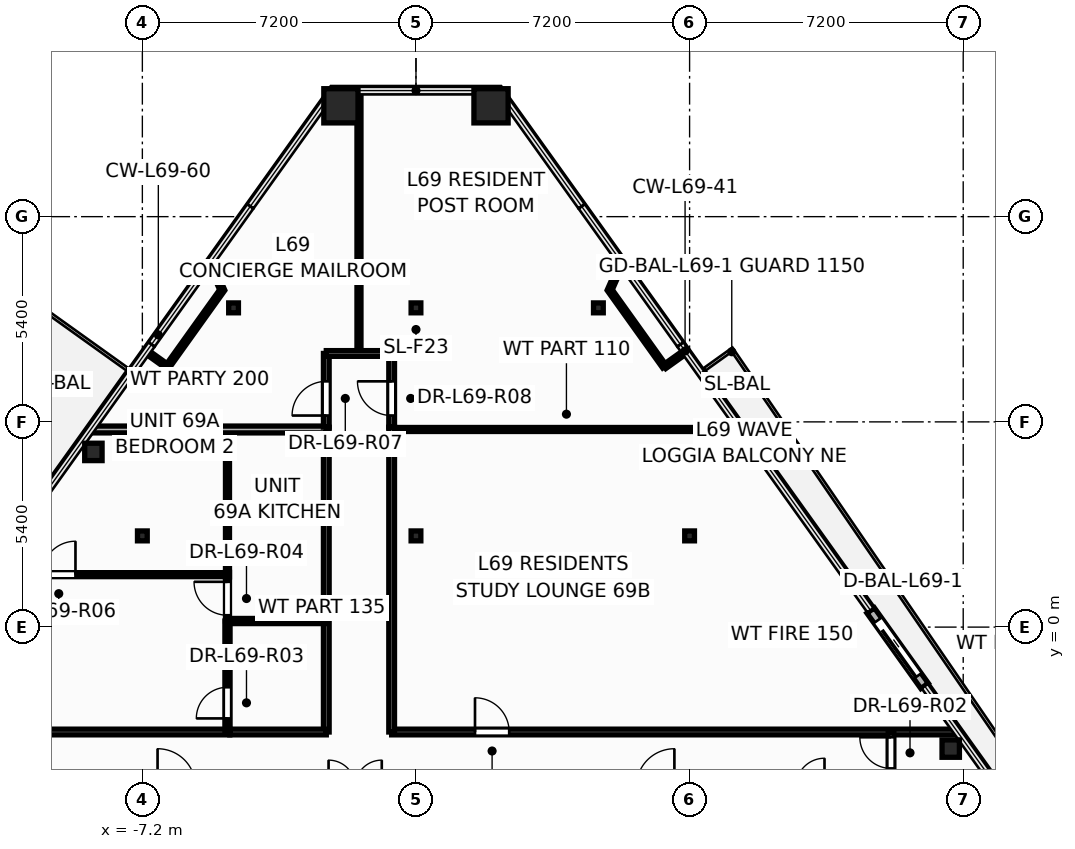
"""IFC4 building model, lengths in metres.
Left out: names, types, materials, properties, quantities, classifications, styles, units other than length and angle.
Written with IfcOpenShell. Run it as: python <this file> out.ifc"""

import sys

from ifc_helpers import new_model, si_unit, direction, frame, frame_2d, origin, origin_2d, place, context, subcontext, project, spatial, rectangle, hollow_rectangle, hollow_circle, i_section, extrude, element, fill, save


model = new_model("IFC4")
c1 = context("Model", 3, precision=1e-05, world=origin(), true_north=direction((0.0, 1.0)))
c2 = subcontext(c1, "Body", "Model", "MODEL_VIEW")
j1 = project(units=[si_unit("LENGTHUNIT", "METRE"), si_unit("PLANEANGLEUNIT", "RADIAN")], contexts=[c1])
p1 = place(None, origin())
s1 = spatial("IfcSite", under=j1, at=p1, CompositionType="ELEMENT")
p2 = place(p1, origin())
s2 = spatial("IfcBuilding", under=s1, at=p2, CompositionType="ELEMENT")
p3 = place(p2, frame((0.0, 0.0, 263.4)))
s3 = spatial("IfcBuildingStorey", under=s2, at=p3, CompositionType="ELEMENT", Elevation=263.4)
for number, where, z_axis, x_axis in (
    (1, (1.975, 13.717, 0.0), (0.0, 0.0, 1.0), (1.0, 0.0, 0.0)),
    (2, (-1.975, 13.717, 0.0), (0.0, 0.0, 1.0), (1.0, 0.0, 0.0)),
):
    element("IfcColumn", number, at=place(p3, frame(where, z_axis=z_axis, x_axis=x_axis)), inside=s3, PredefinedType="COLUMN", context=c2, shape_type="SweptSolid", body=[
        extrude(hollow_rectangle(XDim=0.9, YDim=0.9, WallThickness=0.04, at=origin_2d()), origin(), (0.0, 0.0, 1.0), 3.6),
    ])
for number, where, z_axis, x_axis in (
    (3, (14.072, -3.196, 0.0), (0.0, 0.0, 1.0), (1.0, 0.0, 0.0)),
    (4, (8.489, 4.61, 0.0), (0.0, 0.0, 1.0), (1.0, 0.0, 0.0)),
    (5, (-8.489, 4.61, 0.0), (0.0, 0.0, 1.0), (1.0, 0.0, 0.0)),
):
    element("IfcColumn", number, at=place(p3, frame(where, z_axis=z_axis, x_axis=x_axis)), inside=s3, PredefinedType="COLUMN", context=c2, shape_type="SweptSolid", body=[
        extrude(hollow_circle(Radius=0.229, WallThickness=0.016, at=origin_2d()), origin(), (0.0, 0.0, 1.0), 3.6),
    ])
for number, where, z_axis, x_axis in (
    (6, (-7.2, 2.4, 0.0), (0.0, 0.0, 1.0), (1.0, 0.0, 0.0)),
    (7, (0.0, 2.4, 0.0), (0.0, 0.0, 1.0), (1.0, 0.0, 0.0)),
    (8, (7.2, 2.4, 0.0), (0.0, 0.0, 1.0), (1.0, 0.0, 0.0)),
    (9, (-4.8, 8.4, 0.0), (0.0, 0.0, 1.0), (1.0, 0.0, 0.0)),
    (10, (0.0, 8.4, 0.0), (0.0, 0.0, 1.0), (1.0, 0.0, 0.0)),
    (11, (4.8, 8.4, 0.0), (0.0, 0.0, 1.0), (1.0, 0.0, 0.0)),
):
    element("IfcColumn", number, at=place(p3, frame(where, z_axis=z_axis, x_axis=x_axis)), inside=s3, PredefinedType="COLUMN", context=c2, shape_type="SweptSolid", body=[
        extrude(i_section(OverallWidth=0.256, OverallDepth=0.26, WebThickness=0.01, FlangeThickness=0.017, at=origin_2d()), origin(), (0.0, 0.0, 1.0), 3.6),
    ])
p4 = place(p3, frame((13.383, -1.547, -0.015), z_axis=(0.0, 0.0, 1.0), x_axis=(-0.58167352525, 0.813422344187, 0.0)))
e12 = element("IfcWall", 12, at=p4, inside=s3, PredefinedType="STANDARD", context=c2, shape_type="SweptSolid", body=[
    extrude(rectangle(XDim=2.44, YDim=0.24, at=frame_2d((1.22, 0.0))), origin(), (0.0, 0.0, 1.0), 2.878),
])
p5 = place(p4, frame((0.32, 0.0, 0.015)))
e13 = element("IfcOpeningElement", 13, at=p5, cuts=e12, PredefinedType="OPENING", context=c2, shape_type="SweptSolid", body=[
    extrude(rectangle(XDim=1.806, YDim=2.204, at=frame_2d((0.9, 1.102))), frame((0.0, 0.13, 0.0), z_axis=(0.0, -1.0, 0.0), x_axis=(1.0, 0.0, 0.0)), (0.0, 0.0, 1.0), 0.26),
])
p6 = place(p3, frame((-0.64, -2.76, 0.0), z_axis=(0.0, 0.0, 1.0), x_axis=(1.0, 0.0, 0.0)))
e14 = element("IfcWall", 14, at=p6, inside=s3, PredefinedType="PARTITIONING", context=c2, shape_type="SweptSolid", body=[
    extrude(rectangle(XDim=14.891, YDim=0.15, at=frame_2d((7.446, 0.0))), origin(), (0.0, 0.0, 1.0), 2.32),
])
p7 = place(p6, frame((2.193, 0.0, 0.0)))
e15 = element("IfcOpeningElement", 15, at=p7, cuts=e14, PredefinedType="OPENING", context=c2, shape_type="SweptSolid", body=[
    extrude(rectangle(XDim=0.906, YDim=2.104, at=frame_2d((0.45, 1.052))), frame((0.0, 0.085, 0.0), z_axis=(0.0, -1.0, 0.0), x_axis=(1.0, 0.0, 0.0)), (0.0, 0.0, 1.0), 0.17),
])
p8 = place(p3, frame((-14.251, -2.76, 0.0), z_axis=(0.0, 0.0, 1.0), x_axis=(1.0, 0.0, 0.0)))
e16 = element("IfcWall", 16, at=p8, inside=s3, PredefinedType="PARTITIONING", context=c2, shape_type="SweptSolid", body=[
    extrude(rectangle(XDim=9.351, YDim=0.15, at=frame_2d((4.676, 0.0))), origin(), (0.0, 0.0, 1.0), 2.32),
])
p9 = place(p8, frame((3.386, 0.0, 0.0)))
e17 = element("IfcOpeningElement", 17, at=p9, cuts=e16, PredefinedType="OPENING", context=c2, shape_type="SweptSolid", body=[
    extrude(rectangle(XDim=0.906, YDim=2.104, at=frame_2d((0.45, 1.052))), frame((0.0, 0.085, 0.0), z_axis=(0.0, -1.0, 0.0), x_axis=(1.0, 0.0, 0.0)), (0.0, 0.0, 1.0), 0.17),
])
p10 = place(p3, frame((-0.64, 5.2, 0.0), z_axis=(0.0, 0.0, 1.0), x_axis=(1.0, 0.0, 0.0)))
e18 = element("IfcWall", 18, at=p10, inside=s3, PredefinedType="PARTITIONING", context=c2, shape_type="SweptSolid", body=[
    extrude(rectangle(XDim=9.198, YDim=0.105, at=frame_2d((4.599, 0.0))), origin(), (0.0, 0.0, 1.0), 2.32),
])
p11 = place(p3, frame((-0.64, -2.76, 0.0), z_axis=(0.0, 0.0, 1.0), x_axis=(0.0, 1.0, 0.0)))
e19 = element("IfcWall", 19, at=p11, inside=s3, PredefinedType="PARTITIONING", context=c2, shape_type="SweptSolid", body=[
    extrude(rectangle(XDim=8.02, YDim=0.15, at=frame_2d((4.01, 0.0))), origin(), (0.0, 0.0, 1.0), 2.32),
])
p12 = place(p3, frame((-1.5, 7.2, 0.0), z_axis=(0.0, 0.0, 1.0), x_axis=(0.0, 1.0, 0.0)))
e20 = element("IfcWall", 20, at=p12, inside=s3, PredefinedType="PARTITIONING", context=c2, shape_type="SweptSolid", body=[
    extrude(rectangle(XDim=6.917, YDim=0.105, at=frame_2d((3.458, 0.0))), origin(), (0.0, 0.0, 1.0), 2.718),
])
p13 = place(p3, frame((-11.29, 1.38, 0.0), z_axis=(0.0, 0.0, 1.0), x_axis=(1.0, 0.0, 0.0)))
e21 = element("IfcWall", 21, at=p13, inside=s3, PredefinedType="PARTITIONING", context=c2, shape_type="SweptSolid", body=[
    extrude(rectangle(XDim=6.33, YDim=0.105, at=frame_2d((3.165, 0.0))), origin(), (0.0, 0.0, 1.0), 2.32),
])
p14 = place(p13, frame((1.45, 0.0, 0.0)))
e22 = element("IfcOpeningElement", 22, at=p14, cuts=e21, PredefinedType="OPENING", context=c2, shape_type="SweptSolid", body=[
    extrude(rectangle(XDim=0.886, YDim=2.104, at=frame_2d((0.44, 1.052))), frame((0.0, 0.062, 0.0), z_axis=(0.0, -1.0, 0.0), x_axis=(1.0, 0.0, 0.0)), (0.0, 0.0, 1.0), 0.125),
])
p15 = place(p3, frame((-2.36, -2.76, 0.0), z_axis=(0.0, 0.0, 1.0), x_axis=(0.0, 1.0, 0.0)))
e23 = element("IfcWall", 23, at=p15, inside=s3, PredefinedType="PARTITIONING", context=c2, shape_type="SweptSolid", body=[
    extrude(rectangle(XDim=8.02, YDim=0.15, at=frame_2d((4.01, 0.0))), origin(), (0.0, 0.0, 1.0), 2.32),
])
p16 = place(p3, frame((-4.96, 1.32, 0.0), z_axis=(0.0, 0.0, 1.0), x_axis=(0.0, 1.0, 0.0)))
e24 = element("IfcWall", 24, at=p16, inside=s3, PredefinedType="PARTITIONING", context=c2, shape_type="SweptSolid", body=[
    extrude(rectangle(XDim=3.88, YDim=0.105, at=frame_2d((1.94, 0.0))), origin(), (0.0, 0.0, 1.0), 2.32),
])
p17 = place(p3, frame((-8.558, 5.2, 0.0), z_axis=(0.0, 0.0, 1.0), x_axis=(1.0, 0.0, 0.0)))
e25 = element("IfcWall", 25, at=p17, inside=s3, PredefinedType="PARTITIONING", context=c2, shape_type="SweptSolid", body=[
    extrude(rectangle(XDim=6.198, YDim=0.18, at=frame_2d((3.099, 0.0))), origin(), (0.0, 0.0, 1.0), 2.718),
])
p18 = place(p3, frame((-4.96, -2.76, 0.0), z_axis=(0.0, 0.0, 1.0), x_axis=(0.0, 1.0, 0.0)))
e26 = element("IfcWall", 26, at=p18, inside=s3, PredefinedType="PARTITIONING", context=c2, shape_type="SweptSolid", body=[
    extrude(rectangle(XDim=2.92, YDim=0.135, at=frame_2d((1.46, 0.0))), origin(), (0.0, 0.0, 1.0), 3.345),
])
p19 = place(p18, frame((0.357, 0.0, 0.0)))
e27 = element("IfcOpeningElement", 27, at=p19, cuts=e26, PredefinedType="OPENING", context=c2, shape_type="SweptSolid", body=[
    extrude(rectangle(XDim=0.826, YDim=2.104, at=frame_2d((0.41, 1.052))), frame((0.0, 0.078, 0.0), z_axis=(0.0, -1.0, 0.0), x_axis=(1.0, 0.0, 0.0)), (0.0, 0.0, 1.0), 0.155),
])
p20 = place(p3, frame((-4.898, -2.76, 0.0), z_axis=(0.0, 0.0, 1.0), x_axis=(1.0, 0.0, 0.0)))
e28 = element("IfcWall", 28, at=p20, inside=s3, PredefinedType="PARTITIONING", context=c2, shape_type="SweptSolid", body=[
    extrude(rectangle(XDim=2.538, YDim=0.15, at=frame_2d((1.269, 0.0))), origin(), (0.0, 0.0, 1.0), 2.965),
])
p21 = place(p3, frame((-4.96, 0.16, 0.0), z_axis=(0.0, 0.0, 1.0), x_axis=(1.0, 0.0, 0.0)))
e29 = element("IfcWall", 29, at=p21, inside=s3, PredefinedType="PARTITIONING", context=c2, shape_type="SweptSolid", body=[
    extrude(rectangle(XDim=2.6, YDim=0.135, at=frame_2d((1.3, 0.0))), origin(), (0.0, 0.0, 1.0), 2.965),
])
for number, where, z_axis, x_axis in (
    (30, (-5.097, 8.87, 0.0), (0.0, 0.0, 1.0), (-0.582, -0.813, 0.0)),
    (31, (6.54, 6.853, 0.0), (0.0, 0.0, 1.0), (-0.582, 0.813, 0.0)),
):
    element("IfcWall", number, at=place(p3, frame(where, z_axis=z_axis, x_axis=x_axis)), inside=s3, PredefinedType="PARTITIONING", context=c2, shape_type="SweptSolid", body=[
        extrude(rectangle(XDim=2.48, YDim=0.12, at=frame_2d((1.24, 0.0))), origin(), (0.0, 0.0, 1.0), 2.718),
    ])
p22 = place(p3, frame((-2.36, 5.262, 0.0), z_axis=(0.0, 0.0, 1.0), x_axis=(0.0, 1.0, 0.0)))
e32 = element("IfcWall", 32, at=p22, inside=s3, PredefinedType="PARTITIONING", context=c2, shape_type="SweptSolid", body=[
    extrude(rectangle(XDim=1.938, YDim=0.15, at=frame_2d((0.969, 0.0))), origin(), (0.0, 0.0, 1.0), 2.965),
])
p23 = place(p22, frame((0.305, 0.0, 0.0)))
e33 = element("IfcOpeningElement", 33, at=p23, cuts=e32, PredefinedType="OPENING", context=c2, shape_type="SweptSolid", body=[
    extrude(rectangle(XDim=0.906, YDim=2.104, at=frame_2d((0.45, 1.052))), frame((0.0, 0.085, 0.0), z_axis=(0.0, -1.0, 0.0), x_axis=(1.0, 0.0, 0.0)), (0.0, 0.0, 1.0), 0.17),
])
p24 = place(p3, frame((-0.64, 5.262, 0.0), z_axis=(0.0, 0.0, 1.0), x_axis=(0.0, 1.0, 0.0)))
e34 = element("IfcWall", 34, at=p24, inside=s3, PredefinedType="PARTITIONING", context=c2, shape_type="SweptSolid", body=[
    extrude(rectangle(XDim=1.938, YDim=0.15, at=frame_2d((0.969, 0.0))), origin(), (0.0, 0.0, 1.0), 3.345),
])
p25 = place(p24, frame((0.305, 0.0, 0.0)))
e35 = element("IfcOpeningElement", 35, at=p25, cuts=e34, PredefinedType="OPENING", context=c2, shape_type="SweptSolid", body=[
    extrude(rectangle(XDim=0.906, YDim=2.104, at=frame_2d((0.45, 1.052))), frame((0.0, 0.085, 0.0), z_axis=(0.0, -1.0, 0.0), x_axis=(1.0, 0.0, 0.0)), (0.0, 0.0, 1.0), 0.17),
])
p26 = place(p3, frame((12.5, -4.24, 0.0), z_axis=(0.0, 0.0, 1.0), x_axis=(0.0, 1.0, 0.0)))
e36 = element("IfcWall", 36, at=p26, inside=s3, PredefinedType="PARTITIONING", context=c2, shape_type="SweptSolid", body=[
    extrude(rectangle(XDim=1.48, YDim=0.15, at=frame_2d((0.74, 0.0))), origin(), (0.0, 0.0, 1.0), 2.32),
])
p27 = place(p26, frame((0.522, 0.0, 0.0)))
e37 = element("IfcOpeningElement", 37, at=p27, cuts=e36, PredefinedType="OPENING", context=c2, shape_type="SweptSolid", body=[
    extrude(rectangle(XDim=0.826, YDim=2.104, at=frame_2d((0.41, 1.052))), frame((0.0, 0.085, 0.0), z_axis=(0.0, -1.0, 0.0), x_axis=(1.0, 0.0, 0.0)), (0.0, 0.0, 1.0), 0.17),
])
p28 = place(p3, frame((-4.96, 0.16, 0.0), z_axis=(0.0, 0.0, 1.0), x_axis=(0.0, 1.0, 0.0)))
e38 = element("IfcWall", 38, at=p28, inside=s3, PredefinedType="PARTITIONING", context=c2, shape_type="SweptSolid", body=[
    extrude(rectangle(XDim=1.28, YDim=0.105, at=frame_2d((0.64, 0.0))), origin(), (0.0, 0.0, 1.0), 3.345),
])
p29 = place(p28, frame((0.152, 0.0, 0.0)))
e39 = element("IfcOpeningElement", 39, at=p29, cuts=e38, PredefinedType="OPENING", context=c2, shape_type="SweptSolid", body=[
    extrude(rectangle(XDim=0.886, YDim=2.104, at=frame_2d((0.44, 1.052))), frame((0.0, 0.062, 0.0), z_axis=(0.0, -1.0, 0.0), x_axis=(1.0, 0.0, 0.0)), (0.0, 0.0, 1.0), 0.125),
])
p30 = place(p3, frame((-2.36, 7.2, 0.0), z_axis=(0.0, 0.0, 1.0), x_axis=(1.0, 0.0, 0.0)))
e40 = element("IfcWall", 40, at=p30, inside=s3, PredefinedType="PARTITIONING", context=c2, shape_type="SweptSolid", body=[
    extrude(rectangle(XDim=1.72, YDim=0.15, at=frame_2d((0.86, 0.0))), origin(), (0.0, 0.0, 1.0), 2.965),
])
for number, where, z_axis, x_axis in (
    (41, (-5.411, 9.583, 0.0), (0.0, 0.0, 1.0), (0.403, -0.915, 0.0)),
    (42, (5.097, 8.87, 0.0), (0.0, 0.0, 1.0), (0.403, 0.915, 0.0)),
):
    element("IfcWall", number, at=place(p3, frame(where, z_axis=z_axis, x_axis=x_axis)), inside=s3, PredefinedType="PARTITIONING", context=c2, shape_type="SweptSolid", body=[
        extrude(rectangle(XDim=0.779, YDim=0.12, at=frame_2d((0.39, 0.0))), origin(), (0.0, 0.0, 1.0), 2.863),
    ])
for number, where, z_axis, x_axis in (
    (43, (-6.54, 6.853, 0.0), (0.0, 0.0, 1.0), (-0.813, 0.582, 0.0)),
    (44, (7.085, 7.242, 0.0), (0.0, 0.0, 1.0), (-0.813, -0.582, 0.0)),
):
    element("IfcWall", number, at=place(p3, frame(where, z_axis=z_axis, x_axis=x_axis)), inside=s3, PredefinedType="PARTITIONING", context=c2, shape_type="SweptSolid", body=[
        extrude(rectangle(XDim=0.67, YDim=0.12, at=frame_2d((0.335, 0.0))), origin(), (0.0, 0.0, 1.0), 2.863),
    ])
p31 = place(p5, origin())
e45 = element("IfcDoor", 45, at=p31, inside=s3, OperationType="SLIDING_TO_LEFT", PredefinedType="DOOR", context=c2, shape_type="SweptSolid", body=[
    extrude(rectangle(XDim=1.8, YDim=2.2, at=frame_2d((0.9, 1.1))), frame((0.0, 0.025, 0.0), z_axis=(0.0, -1.0, 0.0), x_axis=(1.0, 0.0, 0.0)), (0.0, 0.0, 1.0), 0.05),
])
fill(e13, e45)
p32 = place(p27, origin())
e46 = element("IfcDoor", 46, at=p32, inside=s3, OperationType="SINGLE_SWING_RIGHT", PredefinedType="DOOR", context=c2, shape_type="SweptSolid", body=[
    extrude(rectangle(XDim=0.82, YDim=2.1, at=frame_2d((0.41, 1.05))), frame((0.0, 0.025, 0.0), z_axis=(0.0, -1.0, 0.0), x_axis=(1.0, 0.0, 0.0)), (0.0, 0.0, 1.0), 0.05),
])
fill(e37, e46)
p33 = place(p19, origin())
e47 = element("IfcDoor", 47, at=p33, inside=s3, OperationType="SINGLE_SWING_LEFT", PredefinedType="DOOR", context=c2, shape_type="SweptSolid", body=[
    extrude(rectangle(XDim=0.82, YDim=2.1, at=frame_2d((0.41, 1.05))), frame((0.0, 0.025, 0.0), z_axis=(0.0, -1.0, 0.0), x_axis=(1.0, 0.0, 0.0)), (0.0, 0.0, 1.0), 0.05),
])
fill(e27, e47)
p34 = place(p29, origin())
e48 = element("IfcDoor", 48, at=p34, inside=s3, OperationType="SINGLE_SWING_RIGHT", PredefinedType="DOOR", context=c2, shape_type="SweptSolid", body=[
    extrude(rectangle(XDim=0.88, YDim=2.1, at=frame_2d((0.44, 1.05))), frame((0.0, 0.025, 0.0), z_axis=(0.0, -1.0, 0.0), x_axis=(1.0, 0.0, 0.0)), (0.0, 0.0, 1.0), 0.05),
])
fill(e39, e48)
p35 = place(p14, origin())
e49 = element("IfcDoor", 49, at=p35, inside=s3, OperationType="SINGLE_SWING_RIGHT", PredefinedType="DOOR", context=c2, shape_type="SweptSolid", body=[
    extrude(rectangle(XDim=0.88, YDim=2.1, at=frame_2d((0.44, 1.05))), frame((0.0, 0.025, 0.0), z_axis=(0.0, -1.0, 0.0), x_axis=(1.0, 0.0, 0.0)), (0.0, 0.0, 1.0), 0.05),
])
fill(e22, e49)
p36 = place(p23, origin())
e50 = element("IfcDoor", 50, at=p36, inside=s3, OperationType="SINGLE_SWING_LEFT", PredefinedType="DOOR", context=c2, shape_type="SweptSolid", body=[
    extrude(rectangle(XDim=0.9, YDim=2.1, at=frame_2d((0.45, 1.05))), frame((0.0, 0.025, 0.0), z_axis=(0.0, -1.0, 0.0), x_axis=(1.0, 0.0, 0.0)), (0.0, 0.0, 1.0), 0.05),
])
fill(e33, e50)
p37 = place(p25, origin())
e51 = element("IfcDoor", 51, at=p37, inside=s3, OperationType="SINGLE_SWING_RIGHT", PredefinedType="DOOR", context=c2, shape_type="SweptSolid", body=[
    extrude(rectangle(XDim=0.9, YDim=2.1, at=frame_2d((0.45, 1.05))), frame((0.0, 0.025, 0.0), z_axis=(0.0, -1.0, 0.0), x_axis=(1.0, 0.0, 0.0)), (0.0, 0.0, 1.0), 0.05),
])
fill(e35, e51)
p38 = place(p7, origin())
e52 = element("IfcDoor", 52, at=p38, inside=s3, OperationType="SINGLE_SWING_LEFT", PredefinedType="DOOR", context=c2, shape_type="SweptSolid", body=[
    extrude(rectangle(XDim=0.9, YDim=2.1, at=frame_2d((0.45, 1.05))), frame((0.0, 0.025, 0.0), z_axis=(0.0, -1.0, 0.0), x_axis=(1.0, 0.0, 0.0)), (0.0, 0.0, 1.0), 0.05),
])
fill(e15, e52)
save(model, sys.argv[1])
